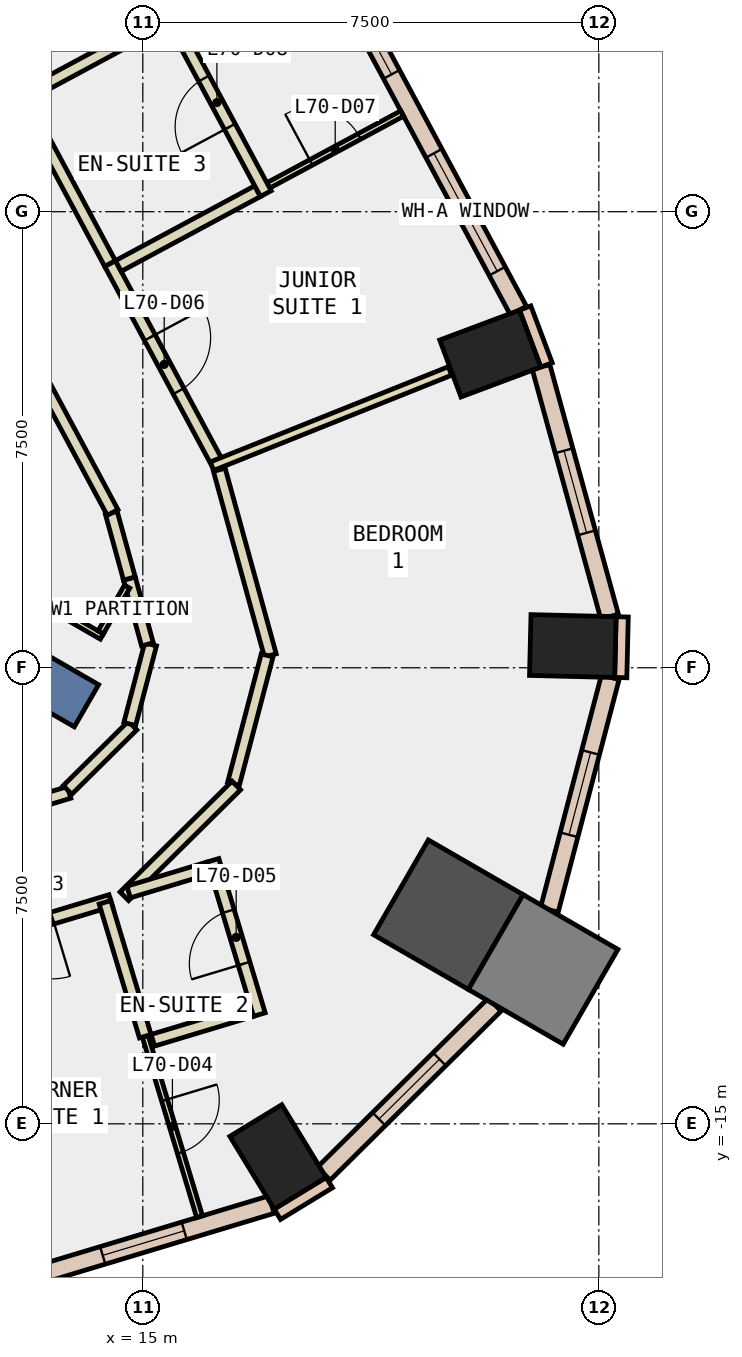
"""IFC4 building model, lengths in metres.
Left out: names, types, materials, properties, quantities, classifications, styles, units other than length and angle.
Written with IfcOpenShell. Run it as: python <this file> out.ifc"""

import sys

from ifc_helpers import new_model, si_unit, direction, frame, frame_2d, origin, origin_2d, place, context, subcontext, project, spatial, rectangle, extrude, element, fill, save


model = new_model("IFC4")
c1 = context("Model", 3, precision=1e-05, world=origin(), true_north=direction((0.0, 1.0)))
c2 = subcontext(c1, "Body", "Model", "MODEL_VIEW")
j1 = project(units=[si_unit("LENGTHUNIT", "METRE"), si_unit("PLANEANGLEUNIT", "RADIAN")], contexts=[c1])
p1 = place(None, origin())
s1 = spatial("IfcSite", under=j1, at=p1, CompositionType="ELEMENT")
p2 = place(p1, origin())
s2 = spatial("IfcBuilding", under=s1, at=p2, CompositionType="ELEMENT")
p3 = place(p2, frame((0.0, 0.0, 300.8)))
s3 = spatial("IfcBuildingStorey", under=s2, at=p3, CompositionType="ELEMENT", Elevation=300.8)
p4 = place(p3, frame((17.223, -15.544, -0.34), z_axis=(0.0, 0.0, 1.0), x_axis=(0.853650808213, 0.520845752251, 0.0)))
e1 = element("IfcColumn", 1, at=p4, inside=s3, PredefinedType="COLUMN", context=c2, shape_type="SweptSolid", body=[
    extrude(rectangle(XDim=1.0, YDim=1.4, at=origin_2d()), origin(), (0.0, 0.0, 1.0), 3.6),
])
p5 = place(p3, frame((20.025, -11.561, -0.34), z_axis=(0.0, 0.0, 1.0), x_axis=(-0.866025403784, 0.5, 0.0)))
e2 = element("IfcColumn", 2, at=p5, inside=s3, PredefinedType="COLUMN", context=c2, shape_type="SweptSolid", body=[
    extrude(rectangle(XDim=1.8, YDim=1.8, at=origin_2d()), origin(), (0.0, 0.0, 1.0), 3.6),
])
for number, where, z_axis, x_axis in (
    (3, (22.072, -7.143, -0.34), (0.0, 0.0, 1.0), (0.024, 1.0, 0.0)),
    (4, (20.714, -2.333, -0.34), (0.0, 0.0, 1.0), (-0.351, 0.936, 0.0)),
):
    element("IfcColumn", number, at=place(p3, frame(where, z_axis=z_axis, x_axis=x_axis)), inside=s3, PredefinedType="COLUMN", context=c2, shape_type="SweptSolid", body=[
        extrude(rectangle(XDim=1.0, YDim=1.4, at=origin_2d()), origin(), (0.0, 0.0, 1.0), 3.6),
    ])
p6 = place(p3, frame((21.584, -12.461, -0.34), z_axis=(0.0, 0.0, 1.0), x_axis=(-0.866025403784, 0.5, 0.0)))
e5 = element("IfcColumn", 5, at=p6, inside=s3, PredefinedType="COLUMN", context=c2, shape_type="SweptSolid", body=[
    extrude(rectangle(XDim=1.8, YDim=1.8, at=origin_2d()), origin(), (0.0, 0.0, 1.0), 3.6),
])
p7 = place(p3, frame((6.279, -3.625, -0.34), z_axis=(0.0, 0.0, 1.0), x_axis=(0.866017533419, -0.500013631625, 0.0)))
e6 = element("IfcWall", 6, at=p7, inside=s3, PredefinedType="SHEAR", context=c2, shape_type="SweptSolid", body=[
    extrude(rectangle(XDim=9.0, YDim=0.8, at=frame_2d((4.5, 0.0))), origin(), (0.0, 0.0, 1.0), 3.6),
])
p8 = place(p3, frame((21.639, -2.52, 0.0), z_axis=(0.0, 0.0, 1.0), x_axis=(-0.350962844851, 0.936389385637, 0.0)))
e7 = element("IfcWall", 7, at=p8, inside=s3, PredefinedType="STANDARD", context=c2, shape_type="SweptSolid", body=[
    extrude(rectangle(XDim=1.0, YDim=0.2, at=frame_2d((0.5, 0.0))), origin(), (0.0, 0.0, 1.0), 3.26),
])
p9 = place(p3, frame((17.213, -16.487, 0.0), z_axis=(0.0, 0.0, 1.0), x_axis=(0.853679739553, 0.520798331677, 0.0)))
e8 = element("IfcWall", 8, at=p9, inside=s3, PredefinedType="STANDARD", context=c2, shape_type="SweptSolid", body=[
    extrude(rectangle(XDim=1.0, YDim=0.2, at=frame_2d((0.5, 0.0))), origin(), (0.0, 0.0, 1.0), 3.26),
])
p10 = place(p3, frame((22.86, -7.662, 0.0), z_axis=(0.0, 0.0, 1.0), x_axis=(0.023942303888, 0.999713341956, 0.0)))
e9 = element("IfcWall", 9, at=p10, inside=s3, PredefinedType="STANDARD", context=c2, shape_type="SweptSolid", body=[
    extrude(rectangle(XDim=0.999, YDim=0.2, at=frame_2d((0.5, 0.0))), origin(), (0.0, 0.0, 1.0), 3.26),
])
p11 = place(p3, frame((12.904, -17.596, 0.0), z_axis=(0.0, 0.0, 1.0), x_axis=(0.957563190743, 0.288223412884, 0.0)))
e10 = element("IfcWall", 10, at=p11, inside=s3, PredefinedType="STANDARD", context=c2, shape_type="SweptSolid", body=[
    extrude(rectangle(XDim=4.4, YDim=0.3, at=frame_2d((2.2, 0.0))), origin(), (0.0, 0.0, 1.0), 3.26),
])
p12 = place(p11, frame((1.5, 0.0, 0.9)))
e11 = element("IfcOpeningElement", 11, at=p12, cuts=e10, PredefinedType="OPENING", context=c2, shape_type="SweptSolid", body=[
    extrude(rectangle(XDim=1.4, YDim=2.0, at=frame_2d((0.7, 1.0))), frame((0.0, 0.16, 0.0), z_axis=(0.0, -1.0, 0.0), x_axis=(1.0, 0.0, 0.0)), (0.0, 0.0, 1.0), 0.32),
])
p13 = place(p3, frame((17.976, -15.82, 0.0), z_axis=(0.0, 0.0, 1.0), x_axis=(0.710893699296, 0.703299472701, 0.0)))
e12 = element("IfcWall", 12, at=p13, inside=s3, PredefinedType="STANDARD", context=c2, shape_type="SweptSolid", body=[
    extrude(rectangle(XDim=3.954, YDim=0.3, at=frame_2d((1.977, 0.0))), origin(), (0.0, 0.0, 1.0), 3.26),
])
p14 = place(p13, frame((1.277, 0.0, 0.9)))
e13 = element("IfcOpeningElement", 13, at=p14, cuts=e12, PredefinedType="OPENING", context=c2, shape_type="SweptSolid", body=[
    extrude(rectangle(XDim=1.4, YDim=2.0, at=frame_2d((0.7, 1.0))), frame((0.0, 0.16, 0.0), z_axis=(0.0, -1.0, 0.0), x_axis=(1.0, 0.0, 0.0)), (0.0, 0.0, 1.0), 0.32),
])
p15 = place(p3, frame((21.686, -11.482, 0.0), z_axis=(0.0, 0.0, 1.0), x_axis=(0.253402039956, 0.96736105263, 0.0)))
e14 = element("IfcWall", 14, at=p15, inside=s3, PredefinedType="STANDARD", context=c2, shape_type="SweptSolid", body=[
    extrude(rectangle(XDim=3.954, YDim=0.3, at=frame_2d((1.977, 0.0))), origin(), (0.0, 0.0, 1.0), 3.26),
])
p16 = place(p15, frame((1.277, 0.0, 0.9)))
e15 = element("IfcOpeningElement", 15, at=p16, cuts=e14, PredefinedType="OPENING", context=c2, shape_type="SweptSolid", body=[
    extrude(rectangle(XDim=1.4, YDim=2.0, at=frame_2d((0.7, 1.0))), frame((0.0, 0.16, 0.0), z_axis=(0.0, -1.0, 0.0), x_axis=(1.0, 0.0, 0.0)), (0.0, 0.0, 1.0), 0.32),
])
p17 = place(p3, frame((22.677, -6.659, 0.0), z_axis=(0.0, 0.0, 1.0), x_axis=(-0.264892613927, 0.964277917971, 0.0)))
e16 = element("IfcWall", 16, at=p17, inside=s3, PredefinedType="STANDARD", context=c2, shape_type="SweptSolid", body=[
    extrude(rectangle(XDim=4.258, YDim=0.3, at=frame_2d((2.129, 0.0))), origin(), (0.0, 0.0, 1.0), 3.26),
])
p18 = place(p17, frame((1.429, 0.0, 0.9)))
e17 = element("IfcOpeningElement", 17, at=p18, cuts=e16, PredefinedType="OPENING", context=c2, shape_type="SweptSolid", body=[
    extrude(rectangle(XDim=1.4, YDim=2.0, at=frame_2d((0.7, 1.0))), frame((0.0, 0.16, 0.0), z_axis=(0.0, -1.0, 0.0), x_axis=(1.0, 0.0, 0.0)), (0.0, 0.0, 1.0), 0.32),
])
p19 = place(p3, frame((21.177, -1.626, 0.0), z_axis=(0.0, 0.0, 1.0), x_axis=(-0.473225522632, 0.880941317415, 0.0)))
e18 = element("IfcWall", 18, at=p19, inside=s3, PredefinedType="STANDARD", context=c2, shape_type="SweptSolid", body=[
    extrude(rectangle(XDim=7.345, YDim=0.3, at=frame_2d((3.673, 0.0))), origin(), (0.0, 0.0, 1.0), 3.26),
])
p20 = place(p19, frame((0.736, 0.0, 0.9)))
e19 = element("IfcOpeningElement", 19, at=p20, cuts=e18, PredefinedType="OPENING", context=c2, shape_type="SweptSolid", body=[
    extrude(rectangle(XDim=2.2, YDim=2.0, at=frame_2d((1.1, 1.0))), frame((0.0, 0.16, 0.0), z_axis=(0.0, -1.0, 0.0), x_axis=(1.0, 0.0, 0.0)), (0.0, 0.0, 1.0), 0.32),
])
p21 = place(p19, frame((4.409, 0.0, 0.9)))
e20 = element("IfcOpeningElement", 20, at=p21, cuts=e18, PredefinedType="OPENING", context=c2, shape_type="SweptSolid", body=[
    extrude(rectangle(XDim=2.2, YDim=2.0, at=frame_2d((1.1, 1.0))), frame((0.0, 0.16, 0.0), z_axis=(0.0, -1.0, 0.0), x_axis=(1.0, 0.0, 0.0)), (0.0, 0.0, 1.0), 0.32),
])
p22 = place(p3, frame((11.286, -10.303, 0.0), z_axis=(0.0, 0.0, 1.0), x_axis=(0.957555754851, 0.288248115955, 0.0)))
e21 = element("IfcWall", 21, at=p22, inside=s3, PredefinedType="PARTITIONING", context=c2, shape_type="SweptSolid", body=[
    extrude(rectangle(XDim=2.612, YDim=0.2, at=frame_2d((1.306, 0.0))), origin(), (0.0, 0.0, 1.0), 3.26),
])
p23 = place(p3, frame((13.762, -9.509, 0.0), z_axis=(0.0, 0.0, 1.0), x_axis=(0.710749293824, 0.703445407497, 0.0)))
e22 = element("IfcWall", 22, at=p23, inside=s3, PredefinedType="PARTITIONING", context=c2, shape_type="SweptSolid", body=[
    extrude(rectangle(XDim=1.504, YDim=0.2, at=frame_2d((0.752, 0.0))), origin(), (0.0, 0.0, 1.0), 3.26),
])
p24 = place(p3, frame((14.785, -8.425, 0.0), z_axis=(0.0, 0.0, 1.0), x_axis=(0.253295121261, 0.967389053869, 0.0)))
e23 = element("IfcWall", 23, at=p24, inside=s3, PredefinedType="PARTITIONING", context=c2, shape_type="SweptSolid", body=[
    extrude(rectangle(XDim=1.354, YDim=0.2, at=frame_2d((0.677, 0.0))), origin(), (0.0, 0.0, 1.0), 3.26),
])
p25 = place(p3, frame((15.076, -7.115, 0.0), z_axis=(0.0, 0.0, 1.0), x_axis=(-0.264368116744, 0.964421846937, 0.0)))
e24 = element("IfcWall", 24, at=p25, inside=s3, PredefinedType="PARTITIONING", context=c2, shape_type="SweptSolid", body=[
    extrude(rectangle(XDim=1.123, YDim=0.2, at=frame_2d((0.562, 0.0))), origin(), (0.0, 0.0, 1.0), 3.26),
])
p26 = place(p3, frame((14.779, -6.032, 0.0), z_axis=(0.0, 0.0, 1.0), x_axis=(-0.265740072272, 0.964044715762, 0.0)))
e25 = element("IfcWall", 25, at=p26, inside=s3, PredefinedType="PARTITIONING", context=c2, shape_type="SweptSolid", body=[
    extrude(rectangle(XDim=1.118, YDim=0.2, at=frame_2d((0.559, 0.0))), origin(), (0.0, 0.0, 1.0), 3.26),
])
p27 = place(p3, frame((14.503, -4.946, 0.0), z_axis=(0.0, 0.0, 1.0), x_axis=(-0.473101362557, 0.881008002658, 0.0)))
e26 = element("IfcWall", 26, at=p27, inside=s3, PredefinedType="PARTITIONING", context=c2, shape_type="SweptSolid", body=[
    extrude(rectangle(XDim=7.497, YDim=0.2, at=frame_2d((3.749, 0.0))), origin(), (0.0, 0.0, 1.0), 3.26),
])
p28 = place(p27, frame((3.249, 0.0, 0.0)))
e27 = element("IfcOpeningElement", 27, at=p28, cuts=e26, PredefinedType="OPENING", context=c2, shape_type="SweptSolid", body=[
    extrude(rectangle(XDim=1.0, YDim=2.1, at=frame_2d((0.5, 1.05))), frame((0.0, 0.11, 0.0), z_axis=(0.0, -1.0, 0.0), x_axis=(1.0, 0.0, 0.0)), (0.0, 0.0, 1.0), 0.22),
])
p29 = place(p3, frame((14.473, -11.328, 0.0), z_axis=(0.0, 0.0, 1.0), x_axis=(-0.957599689503, -0.288102125406, 0.0)))
e28 = element("IfcWall", 28, at=p29, inside=s3, PredefinedType="PARTITIONING", context=c2, shape_type="SweptSolid", body=[
    extrude(rectangle(XDim=2.999, YDim=0.2, at=frame_2d((1.5, 0.0))), origin(), (0.0, 0.0, 1.0), 3.26),
])
p30 = place(p29, frame((1.0, 0.0, 0.0)))
e29 = element("IfcOpeningElement", 29, at=p30, cuts=e28, PredefinedType="OPENING", context=c2, shape_type="SweptSolid", body=[
    extrude(rectangle(XDim=1.0, YDim=2.1, at=frame_2d((0.5, 1.05))), frame((0.0, 0.11, 0.0), z_axis=(0.0, -1.0, 0.0), x_axis=(1.0, 0.0, 0.0)), (0.0, 0.0, 1.0), 0.22),
])
p31 = place(p3, frame((16.258, -4.244, 0.0), z_axis=(0.0, 0.0, 1.0), x_axis=(0.264930673246, -0.964267462053, 0.0)))
e30 = element("IfcWall", 30, at=p31, inside=s3, PredefinedType="PARTITIONING", context=c2, shape_type="SweptSolid", body=[
    extrude(rectangle(XDim=3.166, YDim=0.2, at=frame_2d((1.583, 0.0))), origin(), (0.0, 0.0, 1.0), 3.26),
])
p32 = place(p3, frame((17.045, -7.297, 0.0), z_axis=(0.0, 0.0, 1.0), x_axis=(-0.253618393349, -0.967304352598, 0.0)))
e31 = element("IfcWall", 31, at=p32, inside=s3, PredefinedType="PARTITIONING", context=c2, shape_type="SweptSolid", body=[
    extrude(rectangle(XDim=2.184, YDim=0.2, at=frame_2d((1.092, 0.0))), origin(), (0.0, 0.0, 1.0), 3.26),
])
p33 = place(p3, frame((16.537, -9.436, 0.0), z_axis=(0.0, 0.0, 1.0), x_axis=(-0.710773151724, -0.703421301063, 0.0)))
e32 = element("IfcWall", 32, at=p33, inside=s3, PredefinedType="PARTITIONING", context=c2, shape_type="SweptSolid", body=[
    extrude(rectangle(XDim=2.59, YDim=0.2, at=frame_2d((1.295, 0.0))), origin(), (0.0, 0.0, 1.0), 3.26),
])
p34 = place(p3, frame((14.461, -0.852, 0.0), z_axis=(0.0, 0.0, 1.0), x_axis=(0.473160180459, -0.88097641491, 0.0)))
e33 = element("IfcWall", 33, at=p34, inside=s3, PredefinedType="PARTITIONING", context=c2, shape_type="SweptSolid", body=[
    extrude(rectangle(XDim=3.766, YDim=0.2, at=frame_2d((1.883, 0.0))), origin(), (0.0, 0.0, 1.0), 3.26),
])
p35 = place(p34, frame((1.383, 0.0, 0.0)))
e34 = element("IfcOpeningElement", 34, at=p35, cuts=e33, PredefinedType="OPENING", context=c2, shape_type="SweptSolid", body=[
    extrude(rectangle(XDim=1.0, YDim=2.1, at=frame_2d((0.5, 1.05))), frame((0.0, 0.11, 0.0), z_axis=(0.0, -1.0, 0.0), x_axis=(1.0, 0.0, 0.0)), (0.0, 0.0, 1.0), 0.22),
])
p36 = place(p3, frame((12.947, 1.967, 0.0), z_axis=(0.0, 0.0, 1.0), x_axis=(0.473116768279, -0.88099972961, 0.0)))
e35 = element("IfcWall", 35, at=p36, inside=s3, PredefinedType="PARTITIONING", context=c2, shape_type="SweptSolid", body=[
    extrude(rectangle(XDim=3.2, YDim=0.2, at=frame_2d((1.6, 0.0))), origin(), (0.0, 0.0, 1.0), 3.26),
])
p37 = place(p3, frame((6.835, -2.662, 0.0), z_axis=(0.0, 0.0, 1.0), x_axis=(0.866023427642, -0.500003422764, 0.0)))
e36 = element("IfcWall", 36, at=p37, inside=s3, PredefinedType="PARTITIONING", context=c2, shape_type="SweptSolid", body=[
    extrude(rectangle(XDim=8.65, YDim=0.1, at=frame_2d((4.325, 0.0))), origin(), (0.0, 0.0, 1.0), 3.26),
])
p38 = place(p3, frame((14.307, -6.919, 0.0), z_axis=(0.0, 0.0, 1.0), x_axis=(0.500305662732, 0.865848857387, 0.0)))
e37 = element("IfcWall", 37, at=p38, inside=s3, PredefinedType="PARTITIONING", context=c2, shape_type="SweptSolid", body=[
    extrude(rectangle(XDim=0.87, YDim=0.1, at=frame_2d((0.435, 0.0))), origin(), (0.0, 0.0, 1.0), 3.26),
])
p39 = place(p3, frame((15.04, -13.559, 0.0), z_axis=(0.0, 0.0, 1.0), x_axis=(0.288337370875, -0.957528882362, 0.0)))
e38 = element("IfcWall", 38, at=p39, inside=s3, PredefinedType="PARTITIONING", context=c2, shape_type="SweptSolid", body=[
    extrude(rectangle(XDim=3.101, YDim=0.1, at=frame_2d((1.55, 0.0))), origin(), (0.0, 0.0, 1.0), 3.26),
])
p40 = place(p39, frame((1.1, 0.0, 0.0)))
e39 = element("IfcOpeningElement", 39, at=p40, cuts=e38, PredefinedType="OPENING", context=c2, shape_type="SweptSolid", body=[
    extrude(rectangle(XDim=0.9, YDim=2.1, at=frame_2d((0.45, 1.05))), frame((0.0, 0.06, 0.0), z_axis=(0.0, -1.0, 0.0), x_axis=(1.0, 0.0, 0.0)), (0.0, 0.0, 1.0), 0.12),
])
p41 = place(p3, frame((14.378, -11.357, 0.0), z_axis=(0.0, 0.0, 1.0), x_axis=(0.287932252498, -0.957650780802, 0.0)))
e40 = element("IfcWall", 40, at=p41, inside=s3, PredefinedType="PARTITIONING", context=c2, shape_type="SweptSolid", body=[
    extrude(rectangle(XDim=2.3, YDim=0.2, at=frame_2d((1.15, 0.0))), origin(), (0.0, 0.0, 1.0), 3.26),
])
p42 = place(p3, frame((15.165, -13.626, 0.0), z_axis=(0.0, 0.0, 1.0), x_axis=(0.957565028189, 0.288217308275, 0.0)))
e41 = element("IfcWall", 41, at=p42, inside=s3, PredefinedType="PARTITIONING", context=c2, shape_type="SweptSolid", body=[
    extrude(rectangle(XDim=1.7, YDim=0.2, at=frame_2d((0.85, 0.0))), origin(), (0.0, 0.0, 1.0), 3.26),
])
p43 = place(p3, frame((16.917, -13.203, 0.0), z_axis=(0.0, 0.0, 1.0), x_axis=(-0.287998855134, 0.957630753183, 0.0)))
e42 = element("IfcWall", 42, at=p43, inside=s3, PredefinedType="PARTITIONING", context=c2, shape_type="SweptSolid", body=[
    extrude(rectangle(XDim=2.649, YDim=0.2, at=frame_2d((1.325, 0.0))), origin(), (0.0, 0.0, 1.0), 3.26),
])
p44 = place(p43, frame((0.875, 0.0, 0.0)))
e43 = element("IfcOpeningElement", 43, at=p44, cuts=e42, PredefinedType="OPENING", context=c2, shape_type="SweptSolid", body=[
    extrude(rectangle(XDim=0.9, YDim=2.1, at=frame_2d((0.45, 1.05))), frame((0.0, 0.11, 0.0), z_axis=(0.0, -1.0, 0.0), x_axis=(1.0, 0.0, 0.0)), (0.0, 0.0, 1.0), 0.22),
])
p45 = place(p3, frame((16.087, -10.79, 0.0), z_axis=(0.0, 0.0, 1.0), x_axis=(-0.957425655367, -0.288679951581, 0.0)))
e44 = element("IfcWall", 44, at=p45, inside=s3, PredefinedType="PARTITIONING", context=c2, shape_type="SweptSolid", body=[
    extrude(rectangle(XDim=1.378, YDim=0.2, at=frame_2d((0.689, 0.0))), origin(), (0.0, 0.0, 1.0), 3.26),
])
p46 = place(p3, frame((16.138, -4.185, 0.0), z_axis=(0.0, 0.0, 1.0), x_axis=(0.928432751736, 0.371500505388, 0.0)))
e45 = element("IfcWall", 45, at=p46, inside=s3, PredefinedType="PARTITIONING", context=c2, shape_type="SweptSolid", body=[
    extrude(rectangle(XDim=4.216, YDim=0.15, at=frame_2d((2.108, 0.0))), origin(), (0.0, 0.0, 1.0), 3.26),
])
p47 = place(p3, frame((17.063, 0.432, 0.0), z_axis=(0.0, 0.0, 1.0), x_axis=(0.881003472222, 0.473109799024, 0.0)))
e46 = element("IfcWall", 46, at=p47, inside=s3, PredefinedType="PARTITIONING", context=c2, shape_type="SweptSolid", body=[
    extrude(rectangle(XDim=2.501, YDim=0.1, at=frame_2d((1.25, 0.0))), origin(), (0.0, 0.0, 1.0), 3.26),
])
p48 = place(p47, frame((0.8, 0.0, 0.0)))
e47 = element("IfcOpeningElement", 47, at=p48, cuts=e46, PredefinedType="OPENING", context=c2, shape_type="SweptSolid", body=[
    extrude(rectangle(XDim=0.9, YDim=2.1, at=frame_2d((0.45, 1.05))), frame((0.0, 0.06, 0.0), z_axis=(0.0, -1.0, 0.0), x_axis=(1.0, 0.0, 0.0)), (0.0, 0.0, 1.0), 0.12),
])
p49 = place(p3, frame((14.597, -0.893, 0.0), z_axis=(0.0, 0.0, 1.0), x_axis=(0.880971229432, 0.473169835168, 0.0)))
e48 = element("IfcWall", 48, at=p49, inside=s3, PredefinedType="PARTITIONING", context=c2, shape_type="SweptSolid", body=[
    extrude(rectangle(XDim=2.599, YDim=0.2, at=frame_2d((1.3, 0.0))), origin(), (0.0, 0.0, 1.0), 3.26),
])
p50 = place(p3, frame((17.023, 0.297, 0.0), z_axis=(0.0, 0.0, 1.0), x_axis=(-0.473247398557, 0.88092956572, 0.0)))
e49 = element("IfcWall", 49, at=p50, inside=s3, PredefinedType="PARTITIONING", context=c2, shape_type="SweptSolid", body=[
    extrude(rectangle(XDim=3.4, YDim=0.2, at=frame_2d((1.7, 0.0))), origin(), (0.0, 0.0, 1.0), 3.26),
])
p51 = place(p50, frame((1.25, 0.0, 0.0)))
e50 = element("IfcOpeningElement", 50, at=p51, cuts=e49, PredefinedType="OPENING", context=c2, shape_type="SweptSolid", body=[
    extrude(rectangle(XDim=0.9, YDim=2.1, at=frame_2d((0.45, 1.05))), frame((0.0, 0.11, 0.0), z_axis=(0.0, -1.0, 0.0), x_axis=(1.0, 0.0, 0.0)), (0.0, 0.0, 1.0), 0.22),
])
p52 = place(p3, frame((15.373, 3.157, 0.0), z_axis=(0.0, 0.0, 1.0), x_axis=(-0.880935111027, -0.473237076062, 0.0)))
e51 = element("IfcWall", 51, at=p52, inside=s3, PredefinedType="PARTITIONING", context=c2, shape_type="SweptSolid", body=[
    extrude(rectangle(XDim=2.701, YDim=0.2, at=frame_2d((1.35, 0.0))), origin(), (0.0, 0.0, 1.0), 3.26),
])
p53 = place(p12, origin())
e52 = element("IfcWindow", 52, at=p53, inside=s3, PartitioningType="SINGLE_PANEL", PredefinedType="WINDOW", context=c2, shape_type="SweptSolid", body=[
    extrude(rectangle(XDim=1.4, YDim=2.0, at=frame_2d((0.7, 1.0))), frame((0.0, 0.03, 0.0), z_axis=(0.0, -1.0, 0.0), x_axis=(1.0, 0.0, 0.0)), (0.0, 0.0, 1.0), 0.06),
])
fill(e11, e52)
p54 = place(p14, origin())
e53 = element("IfcWindow", 53, at=p54, inside=s3, PartitioningType="SINGLE_PANEL", PredefinedType="WINDOW", context=c2, shape_type="SweptSolid", body=[
    extrude(rectangle(XDim=1.4, YDim=2.0, at=frame_2d((0.7, 1.0))), frame((0.0, 0.03, 0.0), z_axis=(0.0, -1.0, 0.0), x_axis=(1.0, 0.0, 0.0)), (0.0, 0.0, 1.0), 0.06),
])
fill(e13, e53)
p55 = place(p16, origin())
e54 = element("IfcWindow", 54, at=p55, inside=s3, PartitioningType="SINGLE_PANEL", PredefinedType="WINDOW", context=c2, shape_type="SweptSolid", body=[
    extrude(rectangle(XDim=1.4, YDim=2.0, at=frame_2d((0.7, 1.0))), frame((0.0, 0.03, 0.0), z_axis=(0.0, -1.0, 0.0), x_axis=(1.0, 0.0, 0.0)), (0.0, 0.0, 1.0), 0.06),
])
fill(e15, e54)
p56 = place(p18, origin())
e55 = element("IfcWindow", 55, at=p56, inside=s3, PartitioningType="SINGLE_PANEL", PredefinedType="WINDOW", context=c2, shape_type="SweptSolid", body=[
    extrude(rectangle(XDim=1.4, YDim=2.0, at=frame_2d((0.7, 1.0))), frame((0.0, 0.03, 0.0), z_axis=(0.0, -1.0, 0.0), x_axis=(1.0, 0.0, 0.0)), (0.0, 0.0, 1.0), 0.06),
])
fill(e17, e55)
p57 = place(p20, origin())
e56 = element("IfcWindow", 56, at=p57, inside=s3, PartitioningType="SINGLE_PANEL", PredefinedType="WINDOW", context=c2, shape_type="SweptSolid", body=[
    extrude(rectangle(XDim=2.2, YDim=2.0, at=frame_2d((1.1, 1.0))), frame((0.0, 0.03, 0.0), z_axis=(0.0, -1.0, 0.0), x_axis=(1.0, 0.0, 0.0)), (0.0, 0.0, 1.0), 0.06),
])
fill(e19, e56)
p58 = place(p21, origin())
e57 = element("IfcWindow", 57, at=p58, inside=s3, PartitioningType="SINGLE_PANEL", PredefinedType="WINDOW", context=c2, shape_type="SweptSolid", body=[
    extrude(rectangle(XDim=2.2, YDim=2.0, at=frame_2d((1.1, 1.0))), frame((0.0, 0.03, 0.0), z_axis=(0.0, -1.0, 0.0), x_axis=(1.0, 0.0, 0.0)), (0.0, 0.0, 1.0), 0.06),
])
fill(e20, e57)
p59 = place(p30, origin())
e58 = element("IfcDoor", 58, at=p59, inside=s3, OperationType="SINGLE_SWING_LEFT", PredefinedType="DOOR", context=c2, shape_type="SweptSolid", body=[
    extrude(rectangle(XDim=1.0, YDim=2.1, at=frame_2d((0.5, 1.05))), frame((0.0, 0.025, 0.0), z_axis=(0.0, -1.0, 0.0), x_axis=(1.0, 0.0, 0.0)), (0.0, 0.0, 1.0), 0.05),
])
fill(e29, e58)
p60 = place(p40, origin())
e59 = element("IfcDoor", 59, at=p60, inside=s3, OperationType="SINGLE_SWING_LEFT", PredefinedType="DOOR", context=c2, shape_type="SweptSolid", body=[
    extrude(rectangle(XDim=0.9, YDim=2.1, at=frame_2d((0.45, 1.05))), frame((0.0, 0.025, 0.0), z_axis=(0.0, -1.0, 0.0), x_axis=(1.0, 0.0, 0.0)), (0.0, 0.0, 1.0), 0.05),
])
fill(e39, e59)
p61 = place(p44, origin())
e60 = element("IfcDoor", 60, at=p61, inside=s3, OperationType="SINGLE_SWING_LEFT", PredefinedType="DOOR", context=c2, shape_type="SweptSolid", body=[
    extrude(rectangle(XDim=0.9, YDim=2.1, at=frame_2d((0.45, 1.05))), frame((0.0, 0.025, 0.0), z_axis=(0.0, -1.0, 0.0), x_axis=(1.0, 0.0, 0.0)), (0.0, 0.0, 1.0), 0.05),
])
fill(e43, e60)
p62 = place(p35, origin())
e61 = element("IfcDoor", 61, at=p62, inside=s3, OperationType="SINGLE_SWING_LEFT", PredefinedType="DOOR", context=c2, shape_type="SweptSolid", body=[
    extrude(rectangle(XDim=1.0, YDim=2.1, at=frame_2d((0.5, 1.05))), frame((0.0, 0.025, 0.0), z_axis=(0.0, -1.0, 0.0), x_axis=(1.0, 0.0, 0.0)), (0.0, 0.0, 1.0), 0.05),
])
fill(e34, e61)
p63 = place(p48, origin())
e62 = element("IfcDoor", 62, at=p63, inside=s3, OperationType="SINGLE_SWING_LEFT", PredefinedType="DOOR", context=c2, shape_type="SweptSolid", body=[
    extrude(rectangle(XDim=0.9, YDim=2.1, at=frame_2d((0.45, 1.05))), frame((0.0, 0.025, 0.0), z_axis=(0.0, -1.0, 0.0), x_axis=(1.0, 0.0, 0.0)), (0.0, 0.0, 1.0), 0.05),
])
fill(e47, e62)
p64 = place(p51, origin())
e63 = element("IfcDoor", 63, at=p64, inside=s3, OperationType="SINGLE_SWING_LEFT", PredefinedType="DOOR", context=c2, shape_type="SweptSolid", body=[
    extrude(rectangle(XDim=0.9, YDim=2.1, at=frame_2d((0.45, 1.05))), frame((0.0, 0.025, 0.0), z_axis=(0.0, -1.0, 0.0), x_axis=(1.0, 0.0, 0.0)), (0.0, 0.0, 1.0), 0.05),
])
fill(e50, e63)
save(model, sys.argv[1])
